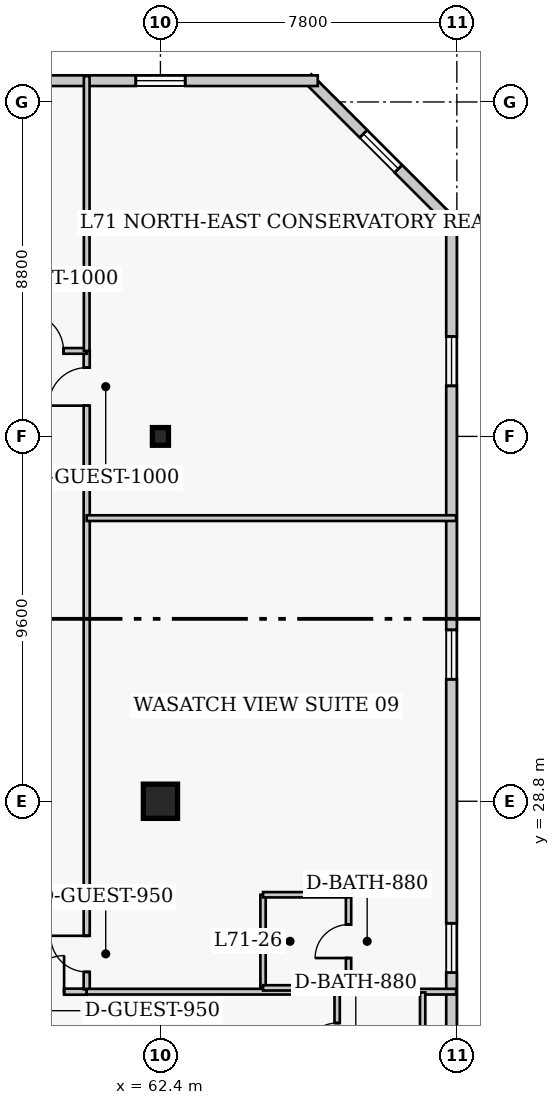
"""IFC4 building model, lengths in metres.
Left out: names, types, materials, properties, quantities, classifications, styles, units other than length and angle.
Written with IfcOpenShell. Run it as: python <this file> out.ifc"""

import sys

from ifc_helpers import new_model, si_unit, direction, frame, frame_2d, origin, origin_2d, place, context, subcontext, project, spatial, rectangle, i_section, extrude, element, fill, save


model = new_model("IFC4")
c1 = context("Model", 3, precision=1e-05, world=origin(), true_north=direction((0.0, 1.0)))
c2 = subcontext(c1, "Body", "Model", "MODEL_VIEW")
j1 = project(units=[si_unit("LENGTHUNIT", "METRE"), si_unit("PLANEANGLEUNIT", "RADIAN")], contexts=[c1])
p1 = place(None, origin())
s1 = spatial("IfcSite", under=j1, at=p1, CompositionType="ELEMENT")
p2 = place(p1, origin())
s2 = spatial("IfcBuilding", under=s1, at=p2, CompositionType="ELEMENT")
p3 = place(p2, frame((0.0, 0.0, 285.4)))
s3 = spatial("IfcBuildingStorey", under=s2, at=p3, CompositionType="ELEMENT", Elevation=285.4)
p4 = place(p3, frame((62.4, 28.8, 0.0), z_axis=(0.0, 0.0, 1.0), x_axis=(1.0, 0.0, 0.0)))
e1 = element("IfcColumn", 1, at=p4, inside=s3, PredefinedType="COLUMN", context=c2, shape_type="SweptSolid", body=[
    extrude(rectangle(XDim=0.9, YDim=0.9, at=origin_2d()), origin(), (0.0, 0.0, 1.0), 4.0),
])
p5 = place(p3, frame((62.4, 38.4, 0.0), z_axis=(0.0, 0.0, 1.0), x_axis=(1.0, 0.0, 0.0)))
e2 = element("IfcColumn", 2, at=p5, inside=s3, PredefinedType="COLUMN", context=c2, shape_type="SweptSolid", body=[
    extrude(i_section(OverallWidth=0.422, OverallDepth=0.465, WebThickness=0.045, FlangeThickness=0.073, FilletRadius=0.017, at=origin_2d()), origin(), (0.0, 0.0, 1.0), 4.0),
])
p6 = place(p3, frame((70.06, 13.36, 0.0), z_axis=(0.0, 0.0, 1.0), x_axis=(0.0, 1.0, 0.0)))
e3 = element("IfcWall", 3, at=p6, inside=s3, PredefinedType="SOLIDWALL", context=c2, shape_type="SweptSolid", body=[
    extrude(rectangle(XDim=30.88, YDim=0.28, at=frame_2d((15.44, 0.0))), origin(), (0.0, 0.0, 1.0), 3.76),
])
p7 = place(p6, frame((3.21, 0.0, 0.85)))
e4 = element("IfcOpeningElement", 4, at=p7, cuts=e3, PredefinedType="OPENING", context=c2, shape_type="SweptSolid", body=[
    extrude(rectangle(XDim=1.3, YDim=1.7, at=frame_2d((0.65, 0.85))), frame((0.0, 0.15, 0.0), z_axis=(0.0, -1.0, 0.0), x_axis=(1.0, 0.0, 0.0)), (0.0, 0.0, 1.0), 0.3),
])
p8 = place(p6, frame((10.93, 0.0, 0.85)))
e5 = element("IfcOpeningElement", 5, at=p8, cuts=e3, PredefinedType="OPENING", context=c2, shape_type="SweptSolid", body=[
    extrude(rectangle(XDim=1.3, YDim=1.7, at=frame_2d((0.65, 0.85))), frame((0.0, 0.15, 0.0), z_axis=(0.0, -1.0, 0.0), x_axis=(1.0, 0.0, 0.0)), (0.0, 0.0, 1.0), 0.3),
])
p9 = place(p6, frame((18.65, 0.0, 0.85)))
e6 = element("IfcOpeningElement", 6, at=p9, cuts=e3, PredefinedType="OPENING", context=c2, shape_type="SweptSolid", body=[
    extrude(rectangle(XDim=1.3, YDim=1.7, at=frame_2d((0.65, 0.85))), frame((0.0, 0.15, 0.0), z_axis=(0.0, -1.0, 0.0), x_axis=(1.0, 0.0, 0.0)), (0.0, 0.0, 1.0), 0.3),
])
p10 = place(p6, frame((26.37, 0.0, 0.85)))
e7 = element("IfcOpeningElement", 7, at=p10, cuts=e3, PredefinedType="OPENING", context=c2, shape_type="SweptSolid", body=[
    extrude(rectangle(XDim=1.3, YDim=1.7, at=frame_2d((0.65, 0.85))), frame((0.0, 0.15, 0.0), z_axis=(0.0, -1.0, 0.0), x_axis=(1.0, 0.0, 0.0)), (0.0, 0.0, 1.0), 0.3),
])
p11 = place(p3, frame((70.129, 43.973, 0.0), z_axis=(0.0, 0.0, 1.0), x_axis=(-0.707106781187, 0.707106781187, 0.0)))
e8 = element("IfcWall", 8, at=p11, inside=s3, PredefinedType="SOLIDWALL", context=c2, shape_type="SweptSolid", body=[
    extrude(rectangle(XDim=5.454, YDim=0.28, at=frame_2d((2.727, 0.0))), origin(), (0.0, 0.0, 1.0), 3.76),
])
p12 = place(p11, frame((2.077, 0.0, 0.85)))
e9 = element("IfcOpeningElement", 9, at=p12, cuts=e8, PredefinedType="OPENING", context=c2, shape_type="SweptSolid", body=[
    extrude(rectangle(XDim=1.3, YDim=1.7, at=frame_2d((0.65, 0.85))), frame((0.0, 0.15, 0.0), z_axis=(0.0, -1.0, 0.0), x_axis=(1.0, 0.0, 0.0)), (0.0, 0.0, 1.0), 0.3),
])
p13 = place(p3, frame((66.54, 47.76, 0.0), z_axis=(0.0, 0.0, 1.0), x_axis=(-1.0, 0.0, 0.0)))
e10 = element("IfcWall", 10, at=p13, inside=s3, PredefinedType="SOLIDWALL", context=c2, shape_type="SweptSolid", body=[
    extrude(rectangle(XDim=24.83, YDim=0.28, at=frame_2d((12.415, 0.0))), origin(), (0.0, 0.0, 1.0), 3.76),
])
p14 = place(p13, frame((3.488, 0.0, 0.85)))
e11 = element("IfcOpeningElement", 11, at=p14, cuts=e10, PredefinedType="OPENING", context=c2, shape_type="SweptSolid", body=[
    extrude(rectangle(XDim=1.3, YDim=1.7, at=frame_2d((0.65, 0.85))), frame((0.0, 0.15, 0.0), z_axis=(0.0, -1.0, 0.0), x_axis=(1.0, 0.0, 0.0)), (0.0, 0.0, 1.0), 0.3),
])
p15 = place(p13, frame((12.915, 0.0, 0.85)))
e12 = element("IfcOpeningElement", 12, at=p15, cuts=e10, PredefinedType="OPENING", context=c2, shape_type="SweptSolid", body=[
    extrude(rectangle(XDim=1.3, YDim=1.7, at=frame_2d((0.65, 0.85))), frame((0.0, 0.15, 0.0), z_axis=(0.0, -1.0, 0.0), x_axis=(1.0, 0.0, 0.0)), (0.0, 0.0, 1.0), 0.3),
])
p16 = place(p13, frame((20.692, 0.0, 0.85)))
e13 = element("IfcOpeningElement", 13, at=p16, cuts=e10, PredefinedType="OPENING", context=c2, shape_type="SweptSolid", body=[
    extrude(rectangle(XDim=1.3, YDim=1.7, at=frame_2d((0.65, 0.85))), frame((0.0, 0.15, 0.0), z_axis=(0.0, -1.0, 0.0), x_axis=(1.0, 0.0, 0.0)), (0.0, 0.0, 1.0), 0.3),
])
p17 = place(p3, frame((35.8, 23.79, 0.0), z_axis=(0.0, 0.0, 1.0), x_axis=(1.0, 0.0, 0.0)))
e14 = element("IfcWall", 14, at=p17, inside=s3, PredefinedType="PARTITIONING", context=c2, shape_type="SweptSolid", body=[
    extrude(rectangle(XDim=24.66, YDim=0.16, at=frame_2d((12.33, 0.0))), origin(), (0.0, 0.0, 1.0), 3.76),
])
p18 = place(p17, frame((0.88, 0.0, 0.0)))
e15 = element("IfcOpeningElement", 15, at=p18, cuts=e14, PredefinedType="OPENING", context=c2, shape_type="SweptSolid", body=[
    extrude(rectangle(XDim=0.95, YDim=2.1, at=frame_2d((0.475, 1.05))), frame((0.0, 0.09, 0.0), z_axis=(0.0, -1.0, 0.0), x_axis=(1.0, 0.0, 0.0)), (0.0, 0.0, 1.0), 0.18),
])
p19 = place(p17, frame((9.095, 0.0, 0.0)))
e16 = element("IfcOpeningElement", 16, at=p19, cuts=e14, PredefinedType="OPENING", context=c2, shape_type="SweptSolid", body=[
    extrude(rectangle(XDim=0.95, YDim=2.1, at=frame_2d((0.475, 1.05))), frame((0.0, 0.09, 0.0), z_axis=(0.0, -1.0, 0.0), x_axis=(1.0, 0.0, 0.0)), (0.0, 0.0, 1.0), 0.18),
])
p20 = place(p17, frame((13.525, 0.0, 0.0)))
e17 = element("IfcOpeningElement", 17, at=p20, cuts=e14, PredefinedType="OPENING", context=c2, shape_type="SweptSolid", body=[
    extrude(rectangle(XDim=1.0, YDim=2.15, at=frame_2d((0.5, 1.075))), frame((0.0, 0.09, 0.0), z_axis=(0.0, -1.0, 0.0), x_axis=(1.0, 0.0, 0.0)), (0.0, 0.0, 1.0), 0.18),
])
p21 = place(p17, frame((18.005, 0.0, 0.0)))
e18 = element("IfcOpeningElement", 18, at=p21, cuts=e14, PredefinedType="OPENING", context=c2, shape_type="SweptSolid", body=[
    extrude(rectangle(XDim=0.95, YDim=2.1, at=frame_2d((0.475, 1.05))), frame((0.0, 0.09, 0.0), z_axis=(0.0, -1.0, 0.0), x_axis=(1.0, 0.0, 0.0)), (0.0, 0.0, 1.0), 0.18),
])
p22 = place(p17, frame((23.115, 0.0, 0.0)))
e19 = element("IfcOpeningElement", 19, at=p22, cuts=e14, PredefinedType="OPENING", context=c2, shape_type="SweptSolid", body=[
    extrude(rectangle(XDim=0.95, YDim=2.1, at=frame_2d((0.475, 1.05))), frame((0.0, 0.09, 0.0), z_axis=(0.0, -1.0, 0.0), x_axis=(1.0, 0.0, 0.0)), (0.0, 0.0, 1.0), 0.18),
])
p23 = place(p3, frame((60.46, 23.85, 0.0), z_axis=(0.0, 0.0, 1.0), x_axis=(0.0, 1.0, 0.0)))
e20 = element("IfcWall", 20, at=p23, inside=s3, PredefinedType="PARTITIONING", context=c2, shape_type="SweptSolid", body=[
    extrude(rectangle(XDim=16.8, YDim=0.16, at=frame_2d((8.4, 0.0))), origin(), (0.0, 0.0, 1.0), 3.76),
])
p24 = place(p23, frame((0.46, 0.0, 0.0)))
e21 = element("IfcOpeningElement", 21, at=p24, cuts=e20, PredefinedType="OPENING", context=c2, shape_type="SweptSolid", body=[
    extrude(rectangle(XDim=0.95, YDim=2.1, at=frame_2d((0.475, 1.05))), frame((0.0, 0.09, 0.0), z_axis=(0.0, -1.0, 0.0), x_axis=(1.0, 0.0, 0.0)), (0.0, 0.0, 1.0), 0.18),
])
p25 = place(p23, frame((15.36, 0.0, 0.0)))
e22 = element("IfcOpeningElement", 22, at=p25, cuts=e20, PredefinedType="OPENING", context=c2, shape_type="SweptSolid", body=[
    extrude(rectangle(XDim=1.0, YDim=2.15, at=frame_2d((0.5, 1.075))), frame((0.0, 0.09, 0.0), z_axis=(0.0, -1.0, 0.0), x_axis=(1.0, 0.0, 0.0)), (0.0, 0.0, 1.0), 0.18),
])
p26 = place(p3, frame((56.8, 40.65, 0.0), z_axis=(0.0, 0.0, 1.0), x_axis=(1.0, 0.0, 0.0)))
e23 = element("IfcWall", 23, at=p26, inside=s3, PredefinedType="PARTITIONING", context=c2, shape_type="SweptSolid", body=[
    extrude(rectangle(XDim=3.66, YDim=0.15, at=frame_2d((1.83, 0.0))), origin(), (0.0, 0.0, 1.0), 3.76),
])
p27 = place(p26, frame((2.05, 0.0, 0.0)))
e24 = element("IfcOpeningElement", 24, at=p27, cuts=e23, PredefinedType="OPENING", context=c2, shape_type="SweptSolid", body=[
    extrude(rectangle(XDim=1.0, YDim=2.15, at=frame_2d((0.5, 1.075))), frame((0.0, 0.085, 0.0), z_axis=(0.0, -1.0, 0.0), x_axis=(1.0, 0.0, 0.0)), (0.0, 0.0, 1.0), 0.17),
])
p28 = place(p3, frame((60.46, 40.65, 0.0), z_axis=(0.0, 0.0, 1.0), x_axis=(0.0, 1.0, 0.0)))
e25 = element("IfcWall", 25, at=p28, inside=s3, PredefinedType="PARTITIONING", context=c2, shape_type="SweptSolid", body=[
    extrude(rectangle(XDim=7.23, YDim=0.15, at=frame_2d((3.615, 0.0))), origin(), (0.0, 0.0, 1.0), 3.76),
])
p29 = place(p3, frame((60.46, 23.79, 0.0), z_axis=(0.0, 0.0, 1.0), x_axis=(1.0, 0.0, 0.0)))
e26 = element("IfcWall", 26, at=p29, inside=s3, PredefinedType="PARTITIONING", context=c2, shape_type="SweptSolid", body=[
    extrude(rectangle(XDim=9.72, YDim=0.15, at=frame_2d((4.86, 0.0))), origin(), (0.0, 0.0, 1.0), 3.76),
])
p30 = place(p3, frame((67.05, 21.28, 0.0), z_axis=(0.0, 0.0, 1.0), x_axis=(0.0, 1.0, 0.0)))
e27 = element("IfcWall", 27, at=p30, inside=s3, PredefinedType="PLUMBINGWALL", context=c2, shape_type="SweptSolid", body=[
    extrude(rectangle(XDim=2.49, YDim=0.14, at=frame_2d((1.245, 0.0))), origin(), (0.0, 0.0, 1.0), 3.76),
])
p31 = place(p30, frame((0.805, 0.0, 0.0)))
e28 = element("IfcOpeningElement", 28, at=p31, cuts=e27, PredefinedType="OPENING", context=c2, shape_type="SweptSolid", body=[
    extrude(rectangle(XDim=0.88, YDim=2.05, at=frame_2d((0.44, 1.025))), frame((0.0, 0.08, 0.0), z_axis=(0.0, -1.0, 0.0), x_axis=(1.0, 0.0, 0.0)), (0.0, 0.0, 1.0), 0.16),
])
p32 = place(p3, frame((69.3, 21.28, 0.0), z_axis=(0.0, 0.0, 1.0), x_axis=(0.0, 1.0, 0.0)))
e29 = element("IfcWall", 29, at=p32, inside=s3, PredefinedType="PLUMBINGWALL", context=c2, shape_type="SweptSolid", body=[
    extrude(rectangle(XDim=2.49, YDim=0.14, at=frame_2d((1.245, 0.0))), origin(), (0.0, 0.0, 1.0), 3.76),
])
p33 = place(p3, frame((65.1, 23.89, 0.0), z_axis=(0.0, 0.0, 1.0), x_axis=(0.0, 1.0, 0.0)))
e30 = element("IfcWall", 30, at=p33, inside=s3, PredefinedType="PLUMBINGWALL", context=c2, shape_type="SweptSolid", body=[
    extrude(rectangle(XDim=2.45, YDim=0.14, at=frame_2d((1.225, 0.0))), origin(), (0.0, 0.0, 1.0), 3.76),
])
p34 = place(p3, frame((67.35, 23.89, 0.0), z_axis=(0.0, 0.0, 1.0), x_axis=(0.0, 1.0, 0.0)))
e31 = element("IfcWall", 31, at=p34, inside=s3, PredefinedType="PLUMBINGWALL", context=c2, shape_type="SweptSolid", body=[
    extrude(rectangle(XDim=2.45, YDim=0.14, at=frame_2d((1.225, 0.0))), origin(), (0.0, 0.0, 1.0), 3.76),
])
p35 = place(p34, frame((0.785, 0.0, 0.0)))
e32 = element("IfcOpeningElement", 32, at=p35, cuts=e31, PredefinedType="OPENING", context=c2, shape_type="SweptSolid", body=[
    extrude(rectangle(XDim=0.88, YDim=2.05, at=frame_2d((0.44, 1.025))), frame((0.0, 0.08, 0.0), z_axis=(0.0, -1.0, 0.0), x_axis=(1.0, 0.0, 0.0)), (0.0, 0.0, 1.0), 0.16),
])
for number, where, z_axis, x_axis in (
    (33, (65.1, 23.89, 0.0), (0.0, 0.0, 1.0), (1.0, 0.0, 0.0)),
    (34, (65.1, 26.34, 0.0), (0.0, 0.0, 1.0), (1.0, 0.0, 0.0)),
):
    element("IfcWall", number, at=place(p3, frame(where, z_axis=z_axis, x_axis=x_axis)), inside=s3, PredefinedType="PLUMBINGWALL", context=c2, shape_type="SweptSolid", body=[
        extrude(rectangle(XDim=2.25, YDim=0.14, at=frame_2d((1.125, 0.0))), origin(), (0.0, 0.0, 1.0), 3.76),
    ])
p36 = place(p3, frame((60.46, 36.25, 0.0), z_axis=(0.0, 0.0, 1.0), x_axis=(1.0, 0.0, 0.0)))
e35 = element("IfcWall", 35, at=p36, inside=s3, PredefinedType="PARTITIONING", context=c2, shape_type="SweptSolid", body=[
    extrude(rectangle(XDim=9.72, YDim=0.15, at=frame_2d((4.86, 0.0))), origin(), (0.0, 0.0, 1.0), 3.76),
])
p37 = place(p8, origin())
e36 = element("IfcWindow", 36, at=p37, inside=s3, PartitioningType="SINGLE_PANEL", PredefinedType="WINDOW", context=c2, shape_type="SweptSolid", body=[
    extrude(rectangle(XDim=1.3, YDim=1.7, at=frame_2d((0.65, 0.85))), frame((0.0, 0.03, 0.0), z_axis=(0.0, -1.0, 0.0), x_axis=(1.0, 0.0, 0.0)), (0.0, 0.0, 1.0), 0.06),
])
fill(e5, e36)
p38 = place(p9, origin())
e37 = element("IfcWindow", 37, at=p38, inside=s3, PartitioningType="SINGLE_PANEL", PredefinedType="WINDOW", context=c2, shape_type="SweptSolid", body=[
    extrude(rectangle(XDim=1.3, YDim=1.7, at=frame_2d((0.65, 0.85))), frame((0.0, 0.03, 0.0), z_axis=(0.0, -1.0, 0.0), x_axis=(1.0, 0.0, 0.0)), (0.0, 0.0, 1.0), 0.06),
])
fill(e6, e37)
p39 = place(p10, origin())
e38 = element("IfcWindow", 38, at=p39, inside=s3, PartitioningType="SINGLE_PANEL", PredefinedType="WINDOW", context=c2, shape_type="SweptSolid", body=[
    extrude(rectangle(XDim=1.3, YDim=1.7, at=frame_2d((0.65, 0.85))), frame((0.0, 0.03, 0.0), z_axis=(0.0, -1.0, 0.0), x_axis=(1.0, 0.0, 0.0)), (0.0, 0.0, 1.0), 0.06),
])
fill(e7, e38)
p40 = place(p12, origin())
e39 = element("IfcWindow", 39, at=p40, inside=s3, PartitioningType="SINGLE_PANEL", PredefinedType="WINDOW", context=c2, shape_type="SweptSolid", body=[
    extrude(rectangle(XDim=1.3, YDim=1.7, at=frame_2d((0.65, 0.85))), frame((0.0, 0.03, 0.0), z_axis=(0.0, -1.0, 0.0), x_axis=(1.0, 0.0, 0.0)), (0.0, 0.0, 1.0), 0.06),
])
fill(e9, e39)
p41 = place(p14, origin())
e40 = element("IfcWindow", 40, at=p41, inside=s3, PartitioningType="SINGLE_PANEL", PredefinedType="WINDOW", context=c2, shape_type="SweptSolid", body=[
    extrude(rectangle(XDim=1.3, YDim=1.7, at=frame_2d((0.65, 0.85))), frame((0.0, 0.03, 0.0), z_axis=(0.0, -1.0, 0.0), x_axis=(1.0, 0.0, 0.0)), (0.0, 0.0, 1.0), 0.06),
])
fill(e11, e40)
p42 = place(p27, origin())
e41 = element("IfcDoor", 41, at=p42, inside=s3, OperationType="SINGLE_SWING_LEFT", PredefinedType="DOOR", context=c2, shape_type="SweptSolid", body=[
    extrude(rectangle(XDim=1.0, YDim=2.15, at=frame_2d((0.5, 1.075))), frame((0.0, 0.025, 0.0), z_axis=(0.0, -1.0, 0.0), x_axis=(1.0, 0.0, 0.0)), (0.0, 0.0, 1.0), 0.05),
])
fill(e24, e41)
p43 = place(p31, origin())
e42 = element("IfcDoor", 42, at=p43, inside=s3, OperationType="SINGLE_SWING_LEFT", PredefinedType="DOOR", context=c2, shape_type="SweptSolid", body=[
    extrude(rectangle(XDim=0.88, YDim=2.05, at=frame_2d((0.44, 1.025))), frame((0.0, 0.025, 0.0), z_axis=(0.0, -1.0, 0.0), x_axis=(1.0, 0.0, 0.0)), (0.0, 0.0, 1.0), 0.05),
])
fill(e28, e42)
p44 = place(p22, origin())
e43 = element("IfcDoor", 43, at=p44, inside=s3, OperationType="SINGLE_SWING_RIGHT", PredefinedType="DOOR", context=c2, shape_type="SweptSolid", body=[
    extrude(rectangle(XDim=0.95, YDim=2.1, at=frame_2d((0.475, 1.05))), frame((0.0, 0.025, 0.0), z_axis=(0.0, -1.0, 0.0), x_axis=(1.0, 0.0, 0.0)), (0.0, 0.0, 1.0), 0.05),
])
fill(e19, e43)
p45 = place(p35, origin())
e44 = element("IfcDoor", 44, at=p45, inside=s3, OperationType="SINGLE_SWING_LEFT", PredefinedType="DOOR", context=c2, shape_type="SweptSolid", body=[
    extrude(rectangle(XDim=0.88, YDim=2.05, at=frame_2d((0.44, 1.025))), frame((0.0, 0.025, 0.0), z_axis=(0.0, -1.0, 0.0), x_axis=(1.0, 0.0, 0.0)), (0.0, 0.0, 1.0), 0.05),
])
fill(e32, e44)
p46 = place(p24, origin())
e45 = element("IfcDoor", 45, at=p46, inside=s3, OperationType="SINGLE_SWING_RIGHT", PredefinedType="DOOR", context=c2, shape_type="SweptSolid", body=[
    extrude(rectangle(XDim=0.95, YDim=2.1, at=frame_2d((0.475, 1.05))), frame((0.0, 0.025, 0.0), z_axis=(0.0, -1.0, 0.0), x_axis=(1.0, 0.0, 0.0)), (0.0, 0.0, 1.0), 0.05),
])
fill(e21, e45)
p47 = place(p25, origin())
e46 = element("IfcDoor", 46, at=p47, inside=s3, OperationType="SINGLE_SWING_LEFT", PredefinedType="DOOR", context=c2, shape_type="SweptSolid", body=[
    extrude(rectangle(XDim=1.0, YDim=2.15, at=frame_2d((0.5, 1.075))), frame((0.0, 0.025, 0.0), z_axis=(0.0, -1.0, 0.0), x_axis=(1.0, 0.0, 0.0)), (0.0, 0.0, 1.0), 0.05),
])
fill(e22, e46)
save(model, sys.argv[1])
